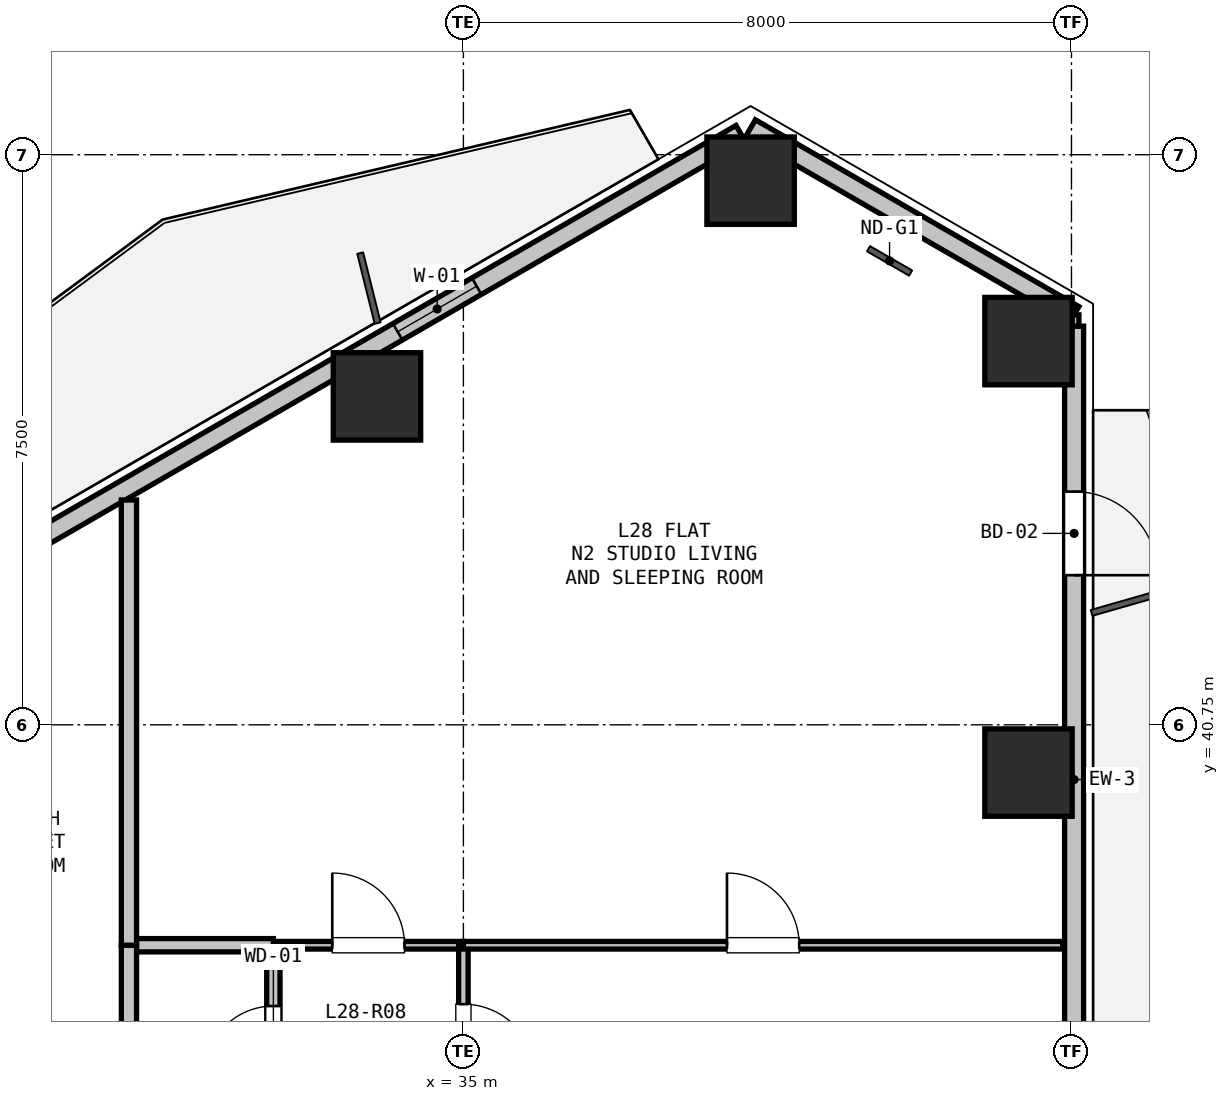
"""IFC4 building model, lengths in metres.
Left out: names, types, materials, properties, quantities, classifications, styles, units other than length and angle.
Written with IfcOpenShell. Run it as: python <this file> out.ifc"""

import sys

from ifc_helpers import new_model, si_unit, direction, frame, frame_2d, origin, origin_2d, place, context, subcontext, project, spatial, rectangle, hollow_rectangle, extrude, element, fill, save


model = new_model("IFC4")
c1 = context("Model", 3, precision=1e-05, world=origin(), true_north=direction((0.0, 1.0)))
c2 = subcontext(c1, "Body", "Model", "MODEL_VIEW")
j1 = project(units=[si_unit("LENGTHUNIT", "METRE"), si_unit("PLANEANGLEUNIT", "RADIAN")], contexts=[c1])
p1 = place(None, origin())
s1 = spatial("IfcSite", under=j1, at=p1, CompositionType="ELEMENT")
p2 = place(p1, origin())
s2 = spatial("IfcBuilding", under=s1, at=p2, CompositionType="ELEMENT")
p3 = place(p2, frame((0.0, 0.0, 103.2)))
s3 = spatial("IfcBuildingStorey", under=s2, at=p3, CompositionType="ELEMENT", Elevation=103.2)
for number, where, z_axis, x_axis in (
    (1, (33.863, 45.071, 0.0), (0.0, 0.0, 1.0), (1.0, 0.0, 0.0)),
    (2, (38.779, 47.909, 0.0), (0.0, 0.0, 1.0), (1.0, 0.0, 0.0)),
    (3, (42.435, 45.798, 0.0), (0.0, 0.0, 1.0), (1.0, 0.0, 0.0)),
    (4, (42.435, 40.122, 0.0), (0.0, 0.0, 1.0), (1.0, 0.0, 0.0)),
):
    element("IfcColumn", number, at=place(p3, frame(where, z_axis=z_axis, x_axis=x_axis)), inside=s3, PredefinedType="COLUMN", context=c2, shape_type="SweptSolid", body=[
        extrude(hollow_rectangle(XDim=1.15, YDim=1.15, WallThickness=0.032, at=origin_2d()), origin(), (0.0, 0.0, 1.0), 3.3),
    ])
p4 = place(p3, frame((38.779, 48.602, 0.0), z_axis=(0.0, 0.0, 1.0), x_axis=(0.866011848704, -0.500023477353, 0.0)))
e5 = element("IfcWall", 5, at=p4, inside=s3, PredefinedType="SOLIDWALL", context=c2, shape_type="SweptSolid", body=[
    extrude(rectangle(XDim=4.914, YDim=0.25, at=frame_2d((2.457, 0.0))), origin(), (0.0, 0.0, 1.0), 2.67),
])
p5 = place(p3, frame((28.317, 42.562, 0.0), z_axis=(0.0, 0.0, 1.0), x_axis=(0.866023023012, 0.500004123596, 0.0)))
e6 = element("IfcWall", 6, at=p5, inside=s3, PredefinedType="SOLIDWALL", context=c2, shape_type="SweptSolid", body=[
    extrude(rectangle(XDim=11.93, YDim=0.25, at=frame_2d((5.965, 0.0))), origin(), (0.0, 0.0, 1.0), 2.67),
])
p6 = place(p5, frame((6.718, 0.0, 0.9)))
e7 = element("IfcOpeningElement", 7, at=p6, cuts=e6, PredefinedType="OPENING", context=c2, shape_type="SweptSolid", body=[
    extrude(rectangle(XDim=1.2, YDim=1.4, at=frame_2d((0.6, 0.7))), frame((0.0, 0.135, 0.0), z_axis=(0.0, -1.0, 0.0), x_axis=(1.0, 0.0, 0.0)), (0.0, 0.0, 1.0), 0.27),
])
p7 = place(p3, frame((43.035, 45.994, 0.0), z_axis=(0.0, 0.0, 1.0), x_axis=(0.0, -1.0, 0.0)))
e8 = element("IfcWall", 8, at=p7, inside=s3, PredefinedType="SOLIDWALL", context=c2, shape_type="SweptSolid", body=[
    extrude(rectangle(XDim=11.93, YDim=0.25, at=frame_2d((5.965, 0.0))), origin(), (0.0, 0.0, 1.0), 2.67),
])
p8 = place(p7, frame((2.176, 0.0, 0.0)))
e9 = element("IfcOpeningElement", 9, at=p8, cuts=e8, PredefinedType="OPENING", context=c2, shape_type="SweptSolid", body=[
    extrude(rectangle(XDim=1.1, YDim=2.1, at=frame_2d((0.55, 1.05))), frame((0.0, 0.135, 0.0), z_axis=(0.0, -1.0, 0.0), x_axis=(1.0, 0.0, 0.0)), (0.0, 0.0, 1.0), 0.27),
])
p9 = place(p3, frame((32.5, 37.85, 0.0), z_axis=(0.0, 0.0, 1.0), x_axis=(1.0, 0.0, 0.0)))
e10 = element("IfcWall", 10, at=p9, inside=s3, PredefinedType="PARTITIONING", context=c2, shape_type="SweptSolid", body=[
    extrude(rectangle(XDim=2.5, YDim=0.1, at=frame_2d((1.25, 0.0))), origin(), (0.0, 0.0, 1.0), 3.05),
])
p10 = place(p9, frame((0.775, 0.0, 0.0)))
e11 = element("IfcOpeningElement", 11, at=p10, cuts=e10, PredefinedType="OPENING", context=c2, shape_type="SweptSolid", body=[
    extrude(rectangle(XDim=0.95, YDim=2.1, at=frame_2d((0.475, 1.05))), frame((0.0, 0.06, 0.0), z_axis=(0.0, -1.0, 0.0), x_axis=(1.0, 0.0, 0.0)), (0.0, 0.0, 1.0), 0.12),
])
p11 = place(p3, frame((35.0, 37.85, 0.0), z_axis=(0.0, 0.0, 1.0), x_axis=(0.0, -1.0, 0.0)))
e12 = element("IfcWall", 12, at=p11, inside=s3, PredefinedType="PARTITIONING", context=c2, shape_type="SweptSolid", body=[
    extrude(rectangle(XDim=2.5, YDim=0.125, at=frame_2d((1.25, 0.0))), origin(), (0.0, 0.0, 1.0), 3.05),
])
p12 = place(p11, frame((0.775, 0.0, 0.0)))
e13 = element("IfcOpeningElement", 13, at=p12, cuts=e12, PredefinedType="OPENING", context=c2, shape_type="SweptSolid", body=[
    extrude(rectangle(XDim=0.95, YDim=2.1, at=frame_2d((0.475, 1.05))), frame((0.0, 0.073, 0.0), z_axis=(0.0, -1.0, 0.0), x_axis=(1.0, 0.0, 0.0)), (0.0, 0.0, 1.0), 0.145),
])
p13 = place(p3, frame((32.5, 35.35, 0.0), z_axis=(0.0, 0.0, 1.0), x_axis=(0.0, 1.0, 0.0)))
e14 = element("IfcWall", 14, at=p13, inside=s3, PredefinedType="PLUMBINGWALL", context=c2, shape_type="SweptSolid", body=[
    extrude(rectangle(XDim=2.5, YDim=0.175, at=frame_2d((1.25, 0.0))), origin(), (0.0, 0.0, 1.0), 3.05),
])
p14 = place(p13, frame((0.8, 0.0, 0.0)))
e15 = element("IfcOpeningElement", 15, at=p14, cuts=e14, PredefinedType="OPENING", context=c2, shape_type="SweptSolid", body=[
    extrude(rectangle(XDim=0.9, YDim=2.1, at=frame_2d((0.45, 1.05))), frame((0.0, 0.097, 0.0), z_axis=(0.0, -1.0, 0.0), x_axis=(1.0, 0.0, 0.0)), (0.0, 0.0, 1.0), 0.195),
])
p15 = place(p3, frame((30.6, 37.85, 0.0), z_axis=(0.0, 0.0, 1.0), x_axis=(1.0, 0.0, 0.0)))
e16 = element("IfcWall", 16, at=p15, inside=s3, PredefinedType="PLUMBINGWALL", context=c2, shape_type="SweptSolid", body=[
    extrude(rectangle(XDim=1.9, YDim=0.175, at=frame_2d((0.95, 0.0))), origin(), (0.0, 0.0, 1.0), 3.05),
])
p16 = place(p3, frame((30.6, 35.35, 0.0), z_axis=(0.0, 0.0, 1.0), x_axis=(0.0, 1.0, 0.0)))
e17 = element("IfcWall", 17, at=p16, inside=s3, PredefinedType="PARTITIONING", context=c2, shape_type="SweptSolid", body=[
    extrude(rectangle(XDim=2.5, YDim=0.2, at=frame_2d((1.25, 0.0))), origin(), (0.0, 0.0, 1.0), 3.05),
])
p17 = place(p3, frame((35.0, 37.85, 0.0), z_axis=(0.0, 0.0, 1.0), x_axis=(1.0, 0.0, 0.0)))
e18 = element("IfcWall", 18, at=p17, inside=s3, PredefinedType="PARTITIONING", context=c2, shape_type="SweptSolid", body=[
    extrude(rectangle(XDim=7.885, YDim=0.1, at=frame_2d((3.943, 0.0))), origin(), (0.0, 0.0, 1.0), 2.365),
])
p18 = place(p17, frame((3.468, 0.0, 0.0)))
e19 = element("IfcOpeningElement", 19, at=p18, cuts=e18, PredefinedType="OPENING", context=c2, shape_type="SweptSolid", body=[
    extrude(rectangle(XDim=0.95, YDim=2.1, at=frame_2d((0.475, 1.05))), frame((0.0, 0.06, 0.0), z_axis=(0.0, -1.0, 0.0), x_axis=(1.0, 0.0, 0.0)), (0.0, 0.0, 1.0), 0.12),
])
p19 = place(p3, frame((30.6, 43.708, 0.0), z_axis=(0.0, 0.0, 1.0), x_axis=(0.0, -1.0, 0.0)))
e20 = element("IfcWall", 20, at=p19, inside=s3, PredefinedType="PARTITIONING", context=c2, shape_type="SweptSolid", body=[
    extrude(rectangle(XDim=5.857, YDim=0.2, at=frame_2d((2.929, 0.0))), origin(), (0.0, 0.0, 1.0), 2.365),
])
p20 = place(p3, frame((43.035, 46.144, 0.0), z_axis=(0.0, 0.0, 1.0), x_axis=(0.0, -1.0, 0.0)))
e21 = element("IfcWall", 21, at=p20, inside=s3, PredefinedType="PARTITIONING", context=c2, shape_type="SweptSolid", body=[
    extrude(rectangle(XDim=0.15, YDim=0.125, at=frame_2d((0.075, 0.0))), origin(), (0.0, 0.0, 1.0), 3.05),
])
p21 = place(p6, origin())
e22 = element("IfcWindow", 22, at=p21, inside=s3, PartitioningType="SINGLE_PANEL", PredefinedType="WINDOW", context=c2, shape_type="SweptSolid", body=[
    extrude(rectangle(XDim=1.2, YDim=1.4, at=frame_2d((0.6, 0.7))), frame((0.0, 0.03, 0.0), z_axis=(0.0, -1.0, 0.0), x_axis=(1.0, 0.0, 0.0)), (0.0, 0.0, 1.0), 0.06),
])
fill(e7, e22)
p22 = place(p8, origin())
e23 = element("IfcDoor", 23, at=p22, inside=s3, OperationType="SINGLE_SWING_RIGHT", PredefinedType="DOOR", context=c2, shape_type="SweptSolid", body=[
    extrude(rectangle(XDim=1.1, YDim=2.1, at=frame_2d((0.55, 1.05))), frame((0.0, 0.025, 0.0), z_axis=(0.0, -1.0, 0.0), x_axis=(1.0, 0.0, 0.0)), (0.0, 0.0, 1.0), 0.05),
])
fill(e9, e23)
p23 = place(p14, origin())
e24 = element("IfcDoor", 24, at=p23, inside=s3, OperationType="SINGLE_SWING_LEFT", PredefinedType="DOOR", context=c2, shape_type="SweptSolid", body=[
    extrude(rectangle(XDim=0.9, YDim=2.1, at=frame_2d((0.45, 1.05))), frame((0.0, 0.025, 0.0), z_axis=(0.0, -1.0, 0.0), x_axis=(1.0, 0.0, 0.0)), (0.0, 0.0, 1.0), 0.05),
])
fill(e15, e24)
p24 = place(p12, origin())
e25 = element("IfcDoor", 25, at=p24, inside=s3, OperationType="SINGLE_SWING_RIGHT", PredefinedType="DOOR", context=c2, shape_type="SweptSolid", body=[
    extrude(rectangle(XDim=0.95, YDim=2.1, at=frame_2d((0.475, 1.05))), frame((0.0, 0.025, 0.0), z_axis=(0.0, -1.0, 0.0), x_axis=(1.0, 0.0, 0.0)), (0.0, 0.0, 1.0), 0.05),
])
fill(e13, e25)
p25 = place(p10, origin())
e26 = element("IfcDoor", 26, at=p25, inside=s3, OperationType="SINGLE_SWING_LEFT", PredefinedType="DOOR", context=c2, shape_type="SweptSolid", body=[
    extrude(rectangle(XDim=0.95, YDim=2.1, at=frame_2d((0.475, 1.05))), frame((0.0, 0.025, 0.0), z_axis=(0.0, -1.0, 0.0), x_axis=(1.0, 0.0, 0.0)), (0.0, 0.0, 1.0), 0.05),
])
fill(e11, e26)
p26 = place(p18, origin())
e27 = element("IfcDoor", 27, at=p26, inside=s3, OperationType="SINGLE_SWING_LEFT", PredefinedType="DOOR", context=c2, shape_type="SweptSolid", body=[
    extrude(rectangle(XDim=0.95, YDim=2.1, at=frame_2d((0.475, 1.05))), frame((0.0, 0.025, 0.0), z_axis=(0.0, -1.0, 0.0), x_axis=(1.0, 0.0, 0.0)), (0.0, 0.0, 1.0), 0.05),
])
fill(e19, e27)
save(model, sys.argv[1])
